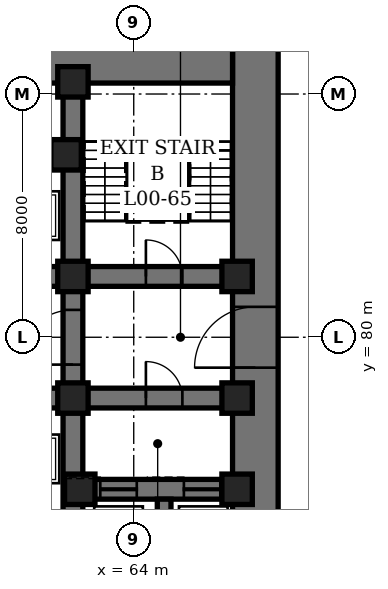
"""IFC4 building model, lengths in metres.
Left out: names, types, materials, properties, quantities, classifications, styles, units other than length and angle.
Written with IfcOpenShell. Run it as: python <this file> out.ifc"""

import sys

from ifc_helpers import new_model, si_unit, direction, frame, frame_2d, origin, origin_2d, place, context, subcontext, project, spatial, rectangle, hollow_rectangle, extrude, element, fill, save


model = new_model("IFC4")
c1 = context("Model", 3, precision=1e-05, world=origin(), true_north=direction((0.0, 1.0)))
c2 = subcontext(c1, "Body", "Model", "MODEL_VIEW")
j1 = project(units=[si_unit("LENGTHUNIT", "METRE"), si_unit("PLANEANGLEUNIT", "RADIAN")], contexts=[c1])
p1 = place(None, origin())
s1 = spatial("IfcSite", under=j1, at=p1, CompositionType="ELEMENT")
p2 = place(p1, origin())
s2 = spatial("IfcBuilding", under=s1, at=p2, CompositionType="ELEMENT")
p3 = place(p2, origin())
s3 = spatial("IfcBuildingStorey", under=s2, at=p3, CompositionType="ELEMENT", Elevation=0.0)
p4 = place(p3, frame((68.0, 70.2, -2.0), z_axis=(0.0, 0.0, 1.0), x_axis=(0.0, 1.0, 0.0)))
e1 = element("IfcWall", 1, at=p4, inside=s3, PredefinedType="SHEAR", context=c2, shape_type="SweptSolid", body=[
    extrude(rectangle(XDim=19.44, YDim=1.5, at=frame_2d((9.72, 0.0))), origin(), (0.0, 0.0, 1.0), 6.9),
])
p5 = place(p4, frame((8.8, 0.0, 2.0)))
e2 = element("IfcOpeningElement", 2, at=p5, cuts=e1, PredefinedType="OPENING", context=c2, shape_type="SweptSolid", body=[
    extrude(rectangle(XDim=2.0, YDim=2.4, at=frame_2d((1.0, 1.2))), frame((0.0, 0.76, 0.0), z_axis=(0.0, -1.0, 0.0), x_axis=(1.0, 0.0, 0.0)), (0.0, 0.0, 1.0), 1.52),
])
p6 = place(p3, frame((44.64, 89.0, -2.0), z_axis=(0.0, 0.0, 1.0), x_axis=(1.0, 0.0, 0.0)))
e3 = element("IfcWall", 3, at=p6, inside=s3, PredefinedType="SHEAR", context=c2, shape_type="SweptSolid", body=[
    extrude(rectangle(XDim=22.61, YDim=1.28, at=frame_2d((11.305, 0.0))), origin(), (0.0, 0.0, 1.0), 6.9),
])
p7 = place(p6, frame((7.86, 0.0, 2.0)))
e4 = element("IfcOpeningElement", 4, at=p7, cuts=e3, PredefinedType="OPENING", context=c2, shape_type="SweptSolid", body=[
    extrude(rectangle(XDim=1.0, YDim=2.1, at=frame_2d((0.5, 1.05))), frame((0.0, 0.65, 0.0), z_axis=(0.0, -1.0, 0.0), x_axis=(1.0, 0.0, 0.0)), (0.0, 0.0, 1.0), 1.3),
])
p8 = place(p6, frame((13.91, 0.0, 2.0)))
e5 = element("IfcOpeningElement", 5, at=p8, cuts=e3, PredefinedType="OPENING", context=c2, shape_type="SweptSolid", body=[
    extrude(rectangle(XDim=0.9, YDim=2.1, at=frame_2d((0.45, 1.05))), frame((0.0, 0.65, 0.0), z_axis=(0.0, -1.0, 0.0), x_axis=(1.0, 0.0, 0.0)), (0.0, 0.0, 1.0), 1.3),
])
p9 = place(p3, frame((62.0, 71.8, -2.0), z_axis=(0.0, 0.0, 1.0), x_axis=(0.0, 1.0, 0.0)))
e6 = element("IfcWall", 6, at=p9, inside=s3, PredefinedType="SHEAR", context=c2, shape_type="SweptSolid", body=[
    extrude(rectangle(XDim=16.56, YDim=0.65, at=frame_2d((8.28, 0.0))), origin(), (0.0, 0.0, 1.0), 6.9),
])
p10 = place(p9, frame((7.3, 0.0, 2.0)))
e7 = element("IfcOpeningElement", 7, at=p10, cuts=e6, PredefinedType="OPENING", context=c2, shape_type="SweptSolid", body=[
    extrude(rectangle(XDim=1.8, YDim=2.4, at=frame_2d((0.9, 1.2))), frame((0.0, 0.335, 0.0), z_axis=(0.0, -1.0, 0.0), x_axis=(1.0, 0.0, 0.0)), (0.0, 0.0, 1.0), 0.67),
])
p11 = place(p3, frame((62.325, 75.0, -2.0), z_axis=(0.0, 0.0, 1.0), x_axis=(1.0, 0.0, 0.0)))
e8 = element("IfcWall", 8, at=p11, inside=s3, PredefinedType="SHEAR", context=c2, shape_type="SweptSolid", body=[
    extrude(rectangle(XDim=4.925, YDim=0.65, at=frame_2d((2.462, 0.0))), origin(), (0.0, 0.0, 1.0), 6.9),
])
p12 = place(p11, frame((0.575, 0.0, 2.0)))
e9 = element("IfcOpeningElement", 9, at=p12, cuts=e8, PredefinedType="OPENING", context=c2, shape_type="SweptSolid", body=[
    extrude(rectangle(XDim=1.2, YDim=2.2, at=frame_2d((0.6, 1.1))), frame((0.0, 0.335, 0.0), z_axis=(0.0, -1.0, 0.0), x_axis=(1.0, 0.0, 0.0)), (0.0, 0.0, 1.0), 0.67),
])
p13 = place(p11, frame((3.325, 0.0, 2.0)))
e10 = element("IfcOpeningElement", 10, at=p13, cuts=e8, PredefinedType="OPENING", context=c2, shape_type="SweptSolid", body=[
    extrude(rectangle(XDim=1.2, YDim=2.2, at=frame_2d((0.6, 1.1))), frame((0.0, 0.335, 0.0), z_axis=(0.0, -1.0, 0.0), x_axis=(1.0, 0.0, 0.0)), (0.0, 0.0, 1.0), 0.67),
])
p14 = place(p3, frame((62.325, 78.0, -2.0), z_axis=(0.0, 0.0, 1.0), x_axis=(1.0, 0.0, 0.0)))
e11 = element("IfcWall", 11, at=p14, inside=s3, PredefinedType="SHEAR", context=c2, shape_type="SweptSolid", body=[
    extrude(rectangle(XDim=4.925, YDim=0.65, at=frame_2d((2.462, 0.0))), origin(), (0.0, 0.0, 1.0), 6.9),
])
p15 = place(p14, frame((2.075, 0.0, 2.0)))
e12 = element("IfcOpeningElement", 12, at=p15, cuts=e11, PredefinedType="OPENING", context=c2, shape_type="SweptSolid", body=[
    extrude(rectangle(XDim=1.2, YDim=2.1, at=frame_2d((0.6, 1.05))), frame((0.0, 0.335, 0.0), z_axis=(0.0, -1.0, 0.0), x_axis=(1.0, 0.0, 0.0)), (0.0, 0.0, 1.0), 0.67),
])
p16 = place(p3, frame((62.325, 82.0, -2.0), z_axis=(0.0, 0.0, 1.0), x_axis=(1.0, 0.0, 0.0)))
e13 = element("IfcWall", 13, at=p16, inside=s3, PredefinedType="SHEAR", context=c2, shape_type="SweptSolid", body=[
    extrude(rectangle(XDim=4.925, YDim=0.65, at=frame_2d((2.462, 0.0))), origin(), (0.0, 0.0, 1.0), 6.9),
])
p17 = place(p16, frame((2.075, 0.0, 2.0)))
e14 = element("IfcOpeningElement", 14, at=p17, cuts=e13, PredefinedType="OPENING", context=c2, shape_type="SweptSolid", body=[
    extrude(rectangle(XDim=1.2, YDim=2.1, at=frame_2d((0.6, 1.05))), frame((0.0, 0.335, 0.0), z_axis=(0.0, -1.0, 0.0), x_axis=(1.0, 0.0, 0.0)), (0.0, 0.0, 1.0), 0.67),
])
p18 = place(p3, frame((50.325, 78.0, -2.0), z_axis=(0.0, 0.0, 1.0), x_axis=(1.0, 0.0, 0.0)))
e15 = element("IfcWall", 15, at=p18, inside=s3, PredefinedType="SHEAR", context=c2, shape_type="SweptSolid", body=[
    extrude(rectangle(XDim=11.35, YDim=0.65, at=frame_2d((5.675, 0.0))), origin(), (0.0, 0.0, 1.0), 6.9),
])
p19 = place(p18, frame((0.625, 0.0, 2.0)))
e16 = element("IfcOpeningElement", 16, at=p19, cuts=e15, PredefinedType="OPENING", context=c2, shape_type="SweptSolid", body=[
    extrude(rectangle(XDim=1.1, YDim=2.2, at=frame_2d((0.55, 1.1))), frame((0.0, 0.335, 0.0), z_axis=(0.0, -1.0, 0.0), x_axis=(1.0, 0.0, 0.0)), (0.0, 0.0, 1.0), 0.67),
])
p20 = place(p18, frame((3.625, 0.0, 2.0)))
e17 = element("IfcOpeningElement", 17, at=p20, cuts=e15, PredefinedType="OPENING", context=c2, shape_type="SweptSolid", body=[
    extrude(rectangle(XDim=1.1, YDim=2.2, at=frame_2d((0.55, 1.1))), frame((0.0, 0.335, 0.0), z_axis=(0.0, -1.0, 0.0), x_axis=(1.0, 0.0, 0.0)), (0.0, 0.0, 1.0), 0.67),
])
p21 = place(p18, frame((6.625, 0.0, 2.0)))
e18 = element("IfcOpeningElement", 18, at=p21, cuts=e15, PredefinedType="OPENING", context=c2, shape_type="SweptSolid", body=[
    extrude(rectangle(XDim=1.1, YDim=2.2, at=frame_2d((0.55, 1.1))), frame((0.0, 0.335, 0.0), z_axis=(0.0, -1.0, 0.0), x_axis=(1.0, 0.0, 0.0)), (0.0, 0.0, 1.0), 0.67),
])
p22 = place(p18, frame((9.625, 0.0, 2.0)))
e19 = element("IfcOpeningElement", 19, at=p22, cuts=e15, PredefinedType="OPENING", context=c2, shape_type="SweptSolid", body=[
    extrude(rectangle(XDim=1.1, YDim=2.2, at=frame_2d((0.55, 1.1))), frame((0.0, 0.335, 0.0), z_axis=(0.0, -1.0, 0.0), x_axis=(1.0, 0.0, 0.0)), (0.0, 0.0, 1.0), 0.67),
])
p23 = place(p3, frame((50.325, 82.0, -2.0), z_axis=(0.0, 0.0, 1.0), x_axis=(1.0, 0.0, 0.0)))
e20 = element("IfcWall", 20, at=p23, inside=s3, PredefinedType="SHEAR", context=c2, shape_type="SweptSolid", body=[
    extrude(rectangle(XDim=11.35, YDim=0.65, at=frame_2d((5.675, 0.0))), origin(), (0.0, 0.0, 1.0), 6.9),
])
p24 = place(p23, frame((0.625, 0.0, 2.0)))
e21 = element("IfcOpeningElement", 21, at=p24, cuts=e20, PredefinedType="OPENING", context=c2, shape_type="SweptSolid", body=[
    extrude(rectangle(XDim=1.1, YDim=2.2, at=frame_2d((0.55, 1.1))), frame((0.0, 0.335, 0.0), z_axis=(0.0, -1.0, 0.0), x_axis=(1.0, 0.0, 0.0)), (0.0, 0.0, 1.0), 0.67),
])
p25 = place(p23, frame((3.625, 0.0, 2.0)))
e22 = element("IfcOpeningElement", 22, at=p25, cuts=e20, PredefinedType="OPENING", context=c2, shape_type="SweptSolid", body=[
    extrude(rectangle(XDim=1.1, YDim=2.2, at=frame_2d((0.55, 1.1))), frame((0.0, 0.335, 0.0), z_axis=(0.0, -1.0, 0.0), x_axis=(1.0, 0.0, 0.0)), (0.0, 0.0, 1.0), 0.67),
])
p26 = place(p23, frame((6.625, 0.0, 2.0)))
e23 = element("IfcOpeningElement", 23, at=p26, cuts=e20, PredefinedType="OPENING", context=c2, shape_type="SweptSolid", body=[
    extrude(rectangle(XDim=1.1, YDim=2.2, at=frame_2d((0.55, 1.1))), frame((0.0, 0.335, 0.0), z_axis=(0.0, -1.0, 0.0), x_axis=(1.0, 0.0, 0.0)), (0.0, 0.0, 1.0), 0.67),
])
p27 = place(p23, frame((9.625, 0.0, 2.0)))
e24 = element("IfcOpeningElement", 24, at=p27, cuts=e20, PredefinedType="OPENING", context=c2, shape_type="SweptSolid", body=[
    extrude(rectangle(XDim=1.1, YDim=2.2, at=frame_2d((0.55, 1.1))), frame((0.0, 0.335, 0.0), z_axis=(0.0, -1.0, 0.0), x_axis=(1.0, 0.0, 0.0)), (0.0, 0.0, 1.0), 0.67),
])
p28 = place(p3, frame((50.325, 86.0, -2.0), z_axis=(0.0, 0.0, 1.0), x_axis=(1.0, 0.0, 0.0)))
e25 = element("IfcWall", 25, at=p28, inside=s3, PredefinedType="SHEAR", context=c2, shape_type="SweptSolid", body=[
    extrude(rectangle(XDim=11.35, YDim=0.65, at=frame_2d((5.675, 0.0))), origin(), (0.0, 0.0, 1.0), 6.9),
])
p29 = place(p3, frame((65.0, 71.8, -2.0), z_axis=(0.0, 0.0, 1.0), x_axis=(0.0, 1.0, 0.0)))
e26 = element("IfcWall", 26, at=p29, inside=s3, PredefinedType="SHEAR", context=c2, shape_type="SweptSolid", body=[
    extrude(rectangle(XDim=2.875, YDim=0.45, at=frame_2d((1.438, 0.0))), origin(), (0.0, 0.0, 1.0), 6.9),
])
for number, where, z_axis, x_axis in (
    (27, (61.775, 86.0, -2.0), (0.0, 0.0, 1.0), (1.0, 0.0, 0.0)),
    (28, (62.0, 78.0, -2.0), (0.0, 0.0, 1.0), (1.0, 0.0, 0.0)),
    (29, (62.0, 82.0, -2.0), (0.0, 0.0, 1.0), (1.0, 0.0, 0.0)),
    (30, (62.0, 88.4, -2.0), (0.0, 0.0, 1.0), (1.0, 0.0, 0.0)),
    (31, (62.225, 75.0, -2.0), (0.0, 0.0, 1.0), (1.0, 0.0, 0.0)),
    (32, (67.4, 75.0, -2.0), (0.0, 0.0, 1.0), (1.0, 0.0, 0.0)),
    (33, (67.4, 78.0, -2.0), (0.0, 0.0, 1.0), (1.0, 0.0, 0.0)),
    (34, (67.4, 82.0, -2.0), (0.0, 0.0, 1.0), (1.0, 0.0, 0.0)),
):
    element("IfcColumn", number, at=place(p3, frame(where, z_axis=z_axis, x_axis=x_axis)), inside=s3, PredefinedType="COLUMN", context=c2, shape_type="SweptSolid", body=[
        extrude(hollow_rectangle(XDim=1.0, YDim=1.0, WallThickness=0.15, at=origin_2d()), origin(), (0.0, 0.0, 1.0), 6.9),
    ])
p30 = place(p17, origin())
e35 = element("IfcDoor", 35, at=p30, inside=s3, OperationType="SINGLE_SWING_LEFT", PredefinedType="DOOR", context=c2, shape_type="SweptSolid", body=[
    extrude(rectangle(XDim=1.2, YDim=2.1, at=frame_2d((0.6, 1.05))), frame((0.0, 0.325, 0.0), z_axis=(0.0, -1.0, 0.0), x_axis=(1.0, 0.0, 0.0)), (0.0, 0.0, 1.0), 0.649),
])
fill(e14, e35)
p31 = place(p5, origin())
e36 = element("IfcDoor", 36, at=p31, inside=s3, OperationType="DOUBLE_DOOR_SINGLE_SWING", PredefinedType="DOOR", context=c2, shape_type="SweptSolid", body=[
    extrude(rectangle(XDim=2.0, YDim=2.4, at=frame_2d((1.0, 1.2))), frame((0.0, -0.05, 0.0), z_axis=(0.0, -1.0, 0.0), x_axis=(1.0, 0.0, 0.0)), (0.0, 0.0, 1.0), 0.7),
])
fill(e2, e36)
p32 = place(p10, origin())
e37 = element("IfcDoor", 37, at=p32, inside=s3, OperationType="DOUBLE_DOOR_SINGLE_SWING", PredefinedType="DOOR", context=c2, shape_type="SweptSolid", body=[
    extrude(rectangle(XDim=1.8, YDim=2.4, at=frame_2d((0.9, 1.2))), frame((0.0, 0.325, 0.0), z_axis=(0.0, -1.0, 0.0), x_axis=(1.0, 0.0, 0.0)), (0.0, 0.0, 1.0), 0.649),
])
fill(e7, e37)
p33 = place(p15, origin())
e38 = element("IfcDoor", 38, at=p33, inside=s3, OperationType="SINGLE_SWING_RIGHT", PredefinedType="DOOR", context=c2, shape_type="SweptSolid", body=[
    extrude(rectangle(XDim=1.2, YDim=2.1, at=frame_2d((0.6, 1.05))), frame((0.0, 0.325, 0.0), z_axis=(0.0, -1.0, 0.0), x_axis=(1.0, 0.0, 0.0)), (0.0, 0.0, 1.0), 0.649),
])
fill(e12, e38)
p34 = place(p12, origin())
e39 = element("IfcDoor", 39, at=p34, inside=s3, OperationType="SLIDING_TO_LEFT", PredefinedType="DOOR", context=c2, shape_type="SweptSolid", body=[
    extrude(rectangle(XDim=1.2, YDim=2.2, at=frame_2d((0.6, 1.1))), frame((0.0, 0.325, 0.0), z_axis=(0.0, -1.0, 0.0), x_axis=(1.0, 0.0, 0.0)), (0.0, 0.0, 1.0), 0.649),
])
fill(e9, e39)
p35 = place(p13, origin())
e40 = element("IfcDoor", 40, at=p35, inside=s3, OperationType="SLIDING_TO_LEFT", PredefinedType="DOOR", context=c2, shape_type="SweptSolid", body=[
    extrude(rectangle(XDim=1.2, YDim=2.2, at=frame_2d((0.6, 1.1))), frame((0.0, 0.325, 0.0), z_axis=(0.0, -1.0, 0.0), x_axis=(1.0, 0.0, 0.0)), (0.0, 0.0, 1.0), 0.649),
])
fill(e10, e40)
save(model, sys.argv[1])
